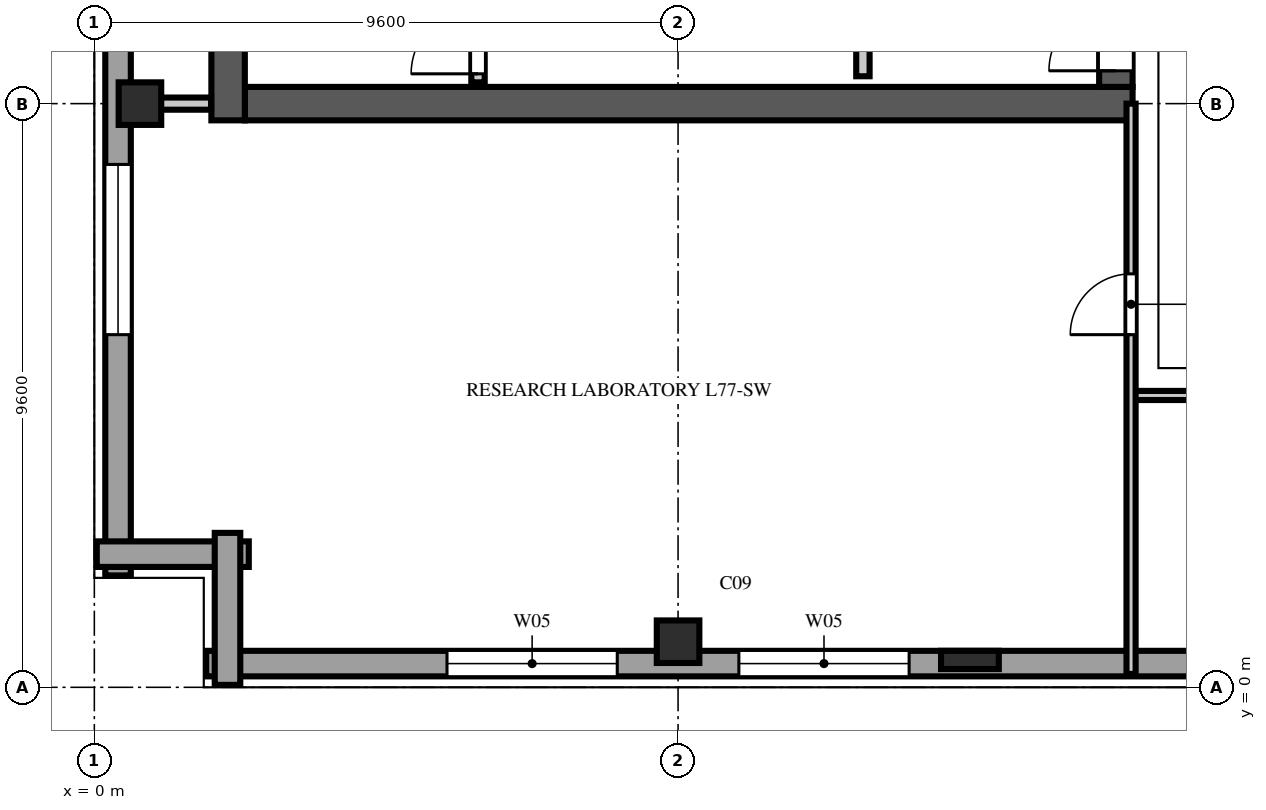
"""IFC4 building model, lengths in metres.
Left out: names, types, materials, properties, quantities, classifications, styles, units other than length and angle.
Written with IfcOpenShell. Run it as: python <this file> out.ifc"""

import sys

from ifc_helpers import new_model, si_unit, direction, frame, frame_2d, origin, origin_2d, place, context, subcontext, project, spatial, rectangle, extrude, element, fill, save


model = new_model("IFC4")
c1 = context("Model", 3, precision=1e-05, world=origin(), true_north=direction((0.0, 1.0)))
c2 = subcontext(c1, "Body", "Model", "MODEL_VIEW")
j1 = project(units=[si_unit("LENGTHUNIT", "METRE"), si_unit("PLANEANGLEUNIT", "RADIAN")], contexts=[c1])
p1 = place(None, origin())
s1 = spatial("IfcSite", under=j1, at=p1, CompositionType="ELEMENT")
p2 = place(p1, origin())
s2 = spatial("IfcBuilding", under=s1, at=p2, CompositionType="ELEMENT")
p3 = place(p2, frame((0.0, 0.0, 303.8)))
s3 = spatial("IfcBuildingStorey", under=s2, at=p3, CompositionType="ELEMENT", Elevation=303.8)
p4 = place(p3, frame((2.475, 9.6, 0.0), z_axis=(0.0, 0.0, 1.0), x_axis=(1.0, 0.0, 0.0)))
e1 = element("IfcWall", 1, at=p4, inside=s3, PredefinedType="SHEAR", context=c2, shape_type="SweptSolid", body=[
    extrude(rectangle(XDim=14.6, YDim=0.55, at=frame_2d((7.3, 0.0))), origin(), (0.0, 0.0, 1.0), 3.88),
])
p5 = place(p3, frame((2.2, 9.325, 0.0), z_axis=(0.0, 0.0, 1.0), x_axis=(0.0, 1.0, 0.0)))
e2 = element("IfcWall", 2, at=p5, inside=s3, PredefinedType="SHEAR", context=c2, shape_type="SweptSolid", body=[
    extrude(rectangle(XDim=38.95, YDim=0.55, at=frame_2d((19.475, 0.0))), origin(), (0.0, 0.0, 1.0), 3.88),
])
p6 = place(p3, frame((16.8, 9.875, 0.0), z_axis=(0.0, 0.0, 1.0), x_axis=(0.0, 1.0, 0.0)))
e3 = element("IfcWall", 3, at=p6, inside=s3, PredefinedType="SHEAR", context=c2, shape_type="SweptSolid", body=[
    extrude(rectangle(XDim=12.525, YDim=0.55, at=frame_2d((6.262, 0.0))), origin(), (0.0, 0.0, 1.0), 3.88),
])
p7 = place(p6, frame((0.265, 0.0, 0.0)))
e4 = element("IfcOpeningElement", 4, at=p7, cuts=e3, PredefinedType="OPENING", context=c2, shape_type="SweptSolid", body=[
    extrude(rectangle(XDim=1.1, YDim=2.2, at=frame_2d((0.55, 1.1))), frame((0.0, 0.287, 0.0), z_axis=(0.0, -1.0, 0.0), x_axis=(1.0, 0.0, 0.0)), (0.0, 0.0, 1.0), 0.574),
])
for number, where, z_axis, x_axis in (
    (5, (0.75, 9.6, 0.0), (0.0, 0.0, 1.0), (1.0, 0.0, 0.0)),
    (6, (9.6, 0.75, 0.0), (0.0, 0.0, 1.0), (1.0, 0.0, 0.0)),
):
    element("IfcColumn", number, at=place(p3, frame(where, z_axis=z_axis, x_axis=x_axis)), inside=s3, PredefinedType="COLUMN", context=c2, shape_type="SweptSolid", body=[
        extrude(rectangle(XDim=0.7, YDim=0.7, at=origin_2d()), origin(), (0.0, 0.0, 1.0), 4.2),
    ])
p8 = place(p3, frame((14.4, 0.45, 0.0), z_axis=(0.0, 0.0, 1.0), x_axis=(1.0, 0.0, 0.0)))
e7 = element("IfcColumn", 7, at=p8, inside=s3, PredefinedType="PILASTER", context=c2, shape_type="SweptSolid", body=[
    extrude(rectangle(XDim=0.95, YDim=0.3, at=origin_2d()), origin(), (0.0, 0.0, 1.0), 4.2),
])
p9 = place(p3, frame((1.84, 0.39, 0.0), z_axis=(0.0, 0.0, 1.0), x_axis=(1.0, 0.0, 0.0)))
e8 = element("IfcWall", 8, at=p9, inside=s3, PredefinedType="SOLIDWALL", context=c2, shape_type="SweptSolid", body=[
    extrude(rectangle(XDim=44.32, YDim=0.42, at=frame_2d((22.16, 0.0))), origin(), (0.0, 0.0, 1.0), 3.88),
])
p10 = place(p9, frame((3.96, 0.0, 0.75)))
e9 = element("IfcOpeningElement", 9, at=p10, cuts=e8, PredefinedType="OPENING", context=c2, shape_type="SweptSolid", body=[
    extrude(rectangle(XDim=2.8, YDim=2.3, at=frame_2d((1.4, 1.15))), frame((0.0, 0.222, 0.0), z_axis=(0.0, -1.0, 0.0), x_axis=(1.0, 0.0, 0.0)), (0.0, 0.0, 1.0), 0.444),
])
p11 = place(p9, frame((8.76, 0.0, 0.75)))
e10 = element("IfcOpeningElement", 10, at=p11, cuts=e8, PredefinedType="OPENING", context=c2, shape_type="SweptSolid", body=[
    extrude(rectangle(XDim=2.8, YDim=2.3, at=frame_2d((1.4, 1.15))), frame((0.0, 0.222, 0.0), z_axis=(0.0, -1.0, 0.0), x_axis=(1.0, 0.0, 0.0)), (0.0, 0.0, 1.0), 0.444),
])
p12 = place(p9, frame((18.36, 0.0, 0.75)))
e11 = element("IfcOpeningElement", 11, at=p12, cuts=e8, PredefinedType="OPENING", context=c2, shape_type="SweptSolid", body=[
    extrude(rectangle(XDim=2.8, YDim=2.3, at=frame_2d((1.4, 1.15))), frame((0.0, 0.222, 0.0), z_axis=(0.0, -1.0, 0.0), x_axis=(1.0, 0.0, 0.0)), (0.0, 0.0, 1.0), 0.444),
])
p13 = place(p9, frame((27.96, 0.0, 0.75)))
e12 = element("IfcOpeningElement", 12, at=p13, cuts=e8, PredefinedType="OPENING", context=c2, shape_type="SweptSolid", body=[
    extrude(rectangle(XDim=2.8, YDim=2.3, at=frame_2d((1.4, 1.15))), frame((0.0, 0.222, 0.0), z_axis=(0.0, -1.0, 0.0), x_axis=(1.0, 0.0, 0.0)), (0.0, 0.0, 1.0), 0.444),
])
p14 = place(p3, frame((0.39, 46.16, 0.0), z_axis=(0.0, 0.0, 1.0), x_axis=(0.0, -1.0, 0.0)))
e13 = element("IfcWall", 13, at=p14, inside=s3, PredefinedType="SOLIDWALL", context=c2, shape_type="SweptSolid", body=[
    extrude(rectangle(XDim=44.32, YDim=0.42, at=frame_2d((22.16, 0.0))), origin(), (0.0, 0.0, 1.0), 3.88),
])
p15 = place(p14, frame((13.56, 0.0, 0.75)))
e14 = element("IfcOpeningElement", 14, at=p15, cuts=e13, PredefinedType="OPENING", context=c2, shape_type="SweptSolid", body=[
    extrude(rectangle(XDim=2.8, YDim=2.3, at=frame_2d((1.4, 1.15))), frame((0.0, 0.222, 0.0), z_axis=(0.0, -1.0, 0.0), x_axis=(1.0, 0.0, 0.0)), (0.0, 0.0, 1.0), 0.444),
])
p16 = place(p14, frame((18.36, 0.0, 0.75)))
e15 = element("IfcOpeningElement", 15, at=p16, cuts=e13, PredefinedType="OPENING", context=c2, shape_type="SweptSolid", body=[
    extrude(rectangle(XDim=2.8, YDim=2.3, at=frame_2d((1.4, 1.15))), frame((0.0, 0.222, 0.0), z_axis=(0.0, -1.0, 0.0), x_axis=(1.0, 0.0, 0.0)), (0.0, 0.0, 1.0), 0.444),
])
p17 = place(p14, frame((23.16, 0.0, 0.75)))
e16 = element("IfcOpeningElement", 16, at=p17, cuts=e13, PredefinedType="OPENING", context=c2, shape_type="SweptSolid", body=[
    extrude(rectangle(XDim=2.8, YDim=2.3, at=frame_2d((1.4, 1.15))), frame((0.0, 0.222, 0.0), z_axis=(0.0, -1.0, 0.0), x_axis=(1.0, 0.0, 0.0)), (0.0, 0.0, 1.0), 0.444),
])
p18 = place(p14, frame((27.96, 0.0, 0.75)))
e17 = element("IfcOpeningElement", 17, at=p18, cuts=e13, PredefinedType="OPENING", context=c2, shape_type="SweptSolid", body=[
    extrude(rectangle(XDim=2.8, YDim=2.3, at=frame_2d((1.4, 1.15))), frame((0.0, 0.222, 0.0), z_axis=(0.0, -1.0, 0.0), x_axis=(1.0, 0.0, 0.0)), (0.0, 0.0, 1.0), 0.444),
])
p19 = place(p14, frame((32.76, 0.0, 0.75)))
e18 = element("IfcOpeningElement", 18, at=p19, cuts=e13, PredefinedType="OPENING", context=c2, shape_type="SweptSolid", body=[
    extrude(rectangle(XDim=2.8, YDim=2.3, at=frame_2d((1.4, 1.15))), frame((0.0, 0.222, 0.0), z_axis=(0.0, -1.0, 0.0), x_axis=(1.0, 0.0, 0.0)), (0.0, 0.0, 1.0), 0.444),
])
p20 = place(p14, frame((37.56, 0.0, 0.75)))
e19 = element("IfcOpeningElement", 19, at=p20, cuts=e13, PredefinedType="OPENING", context=c2, shape_type="SweptSolid", body=[
    extrude(rectangle(XDim=2.8, YDim=2.3, at=frame_2d((1.4, 1.15))), frame((0.0, 0.222, 0.0), z_axis=(0.0, -1.0, 0.0), x_axis=(1.0, 0.0, 0.0)), (0.0, 0.0, 1.0), 0.444),
])
for number, where, z_axis, x_axis in (
    (20, (0.04, 2.19, 0.0), (0.0, 0.0, 1.0), (1.0, 0.0, 0.0)),
    (21, (2.19, 2.54, 0.0), (0.0, 0.0, 1.0), (0.0, -1.0, 0.0)),
):
    element("IfcWall", number, at=place(p3, frame(where, z_axis=z_axis, x_axis=x_axis)), inside=s3, PredefinedType="SOLIDWALL", context=c2, shape_type="SweptSolid", body=[
        extrude(rectangle(XDim=2.5, YDim=0.42, at=frame_2d((1.25, 0.0))), origin(), (0.0, 0.0, 1.0), 3.88),
    ])
p21 = place(p3, frame((6.31, 9.95, 0.0), z_axis=(0.0, 0.0, 1.0), x_axis=(0.0, 1.0, 0.0)))
e22 = element("IfcWall", 22, at=p21, inside=s3, PredefinedType="SOLIDWALL", context=c2, shape_type="SweptSolid", body=[
    extrude(rectangle(XDim=7.81, YDim=0.22, at=frame_2d((3.905, 0.0))), origin(), (0.0, 0.0, 1.0), 3.88),
])
p22 = place(p21, frame((0.14, 0.0, 0.0)))
e23 = element("IfcOpeningElement", 23, at=p22, cuts=e22, PredefinedType="OPENING", context=c2, shape_type="SweptSolid", body=[
    extrude(rectangle(XDim=1.1, YDim=2.2, at=frame_2d((0.55, 1.1))), frame((0.0, 0.122, 0.0), z_axis=(0.0, -1.0, 0.0), x_axis=(1.0, 0.0, 0.0)), (0.0, 0.0, 1.0), 0.244),
])
p23 = place(p3, frame((12.64, 10.05, 0.0), z_axis=(0.0, 0.0, 1.0), x_axis=(0.0, 1.0, 0.0)))
e24 = element("IfcWall", 24, at=p23, inside=s3, PredefinedType="SOLIDWALL", context=c2, shape_type="SweptSolid", body=[
    extrude(rectangle(XDim=7.71, YDim=0.22, at=frame_2d((3.855, 0.0))), origin(), (0.0, 0.0, 1.0), 3.88),
])
p24 = place(p3, frame((0.85, 9.6, 0.0), z_axis=(0.0, 0.0, 1.0), x_axis=(1.0, 0.0, 0.0)))
e25 = element("IfcWall", 25, at=p24, inside=s3, PredefinedType="SOLIDWALL", context=c2, shape_type="SweptSolid", body=[
    extrude(rectangle(XDim=1.07, YDim=0.2, at=frame_2d((0.535, 0.0))), origin(), (0.0, 0.0, 1.0), 3.572),
])
p25 = place(p3, frame((17.05, 4.8, 0.0), z_axis=(0.0, 0.0, 1.0), x_axis=(1.0, 0.0, 0.0)))
e26 = element("IfcWall", 26, at=p25, inside=s3, PredefinedType="PARTITIONING", context=c2, shape_type="SweptSolid", body=[
    extrude(rectangle(XDim=2.15, YDim=0.15, at=frame_2d((1.075, 0.0))), origin(), (0.0, 0.0, 1.0), 3.88),
])
p26 = place(p3, frame((17.05, 0.22, 0.0), z_axis=(0.0, 0.0, 1.0), x_axis=(0.0, 1.0, 0.0)))
e27 = element("IfcWall", 27, at=p26, inside=s3, PredefinedType="PARTITIONING", context=c2, shape_type="SweptSolid", body=[
    extrude(rectangle(XDim=9.38, YDim=0.15, at=frame_2d((4.69, 0.0))), origin(), (0.0, 0.0, 1.0), 3.88),
])
p27 = place(p26, frame((5.58, 0.0, 0.0)))
e28 = element("IfcOpeningElement", 28, at=p27, cuts=e27, PredefinedType="OPENING", context=c2, shape_type="SweptSolid", body=[
    extrude(rectangle(XDim=1.0, YDim=2.2, at=frame_2d((0.5, 1.1))), frame((0.0, 0.087, 0.0), z_axis=(0.0, -1.0, 0.0), x_axis=(1.0, 0.0, 0.0)), (0.0, 0.0, 1.0), 0.174),
])
p28 = place(p10, origin())
e29 = element("IfcWindow", 29, at=p28, inside=s3, PartitioningType="TRIPLE_PANEL_VERTICAL", PredefinedType="WINDOW", context=c2, shape_type="SweptSolid", body=[
    extrude(rectangle(XDim=2.8, YDim=2.3, at=frame_2d((1.4, 1.15))), frame((0.0, 0.11, 0.0), z_axis=(0.0, -1.0, 0.0), x_axis=(1.0, 0.0, 0.0)), (0.0, 0.0, 1.0), 0.06),
])
fill(e9, e29)
p29 = place(p11, origin())
e30 = element("IfcWindow", 30, at=p29, inside=s3, PartitioningType="TRIPLE_PANEL_VERTICAL", PredefinedType="WINDOW", context=c2, shape_type="SweptSolid", body=[
    extrude(rectangle(XDim=2.8, YDim=2.3, at=frame_2d((1.4, 1.15))), frame((0.0, 0.11, 0.0), z_axis=(0.0, -1.0, 0.0), x_axis=(1.0, 0.0, 0.0)), (0.0, 0.0, 1.0), 0.06),
])
fill(e10, e30)
p30 = place(p20, origin())
e31 = element("IfcWindow", 31, at=p30, inside=s3, PartitioningType="TRIPLE_PANEL_VERTICAL", PredefinedType="WINDOW", context=c2, shape_type="SweptSolid", body=[
    extrude(rectangle(XDim=2.8, YDim=2.3, at=frame_2d((1.4, 1.15))), frame((0.0, 0.11, 0.0), z_axis=(0.0, -1.0, 0.0), x_axis=(1.0, 0.0, 0.0)), (0.0, 0.0, 1.0), 0.06),
])
fill(e19, e31)
p31 = place(p22, origin())
e32 = element("IfcDoor", 32, at=p31, inside=s3, OperationType="SINGLE_SWING_LEFT", PredefinedType="DOOR", context=c2, shape_type="SweptSolid", body=[
    extrude(rectangle(XDim=1.1, YDim=2.2, at=frame_2d((0.55, 1.1))), frame((0.0, 0.025, 0.0), z_axis=(0.0, -1.0, 0.0), x_axis=(1.0, 0.0, 0.0)), (0.0, 0.0, 1.0), 0.05),
])
fill(e23, e32)
p32 = place(p7, origin())
e33 = element("IfcDoor", 33, at=p32, inside=s3, OperationType="SINGLE_SWING_LEFT", PredefinedType="DOOR", context=c2, shape_type="SweptSolid", body=[
    extrude(rectangle(XDim=1.1, YDim=2.2, at=frame_2d((0.55, 1.1))), frame((0.0, 0.025, 0.0), z_axis=(0.0, -1.0, 0.0), x_axis=(1.0, 0.0, 0.0)), (0.0, 0.0, 1.0), 0.05),
])
fill(e4, e33)
p33 = place(p27, origin())
e34 = element("IfcDoor", 34, at=p33, inside=s3, OperationType="SINGLE_SWING_LEFT", PredefinedType="DOOR", context=c2, shape_type="SweptSolid", body=[
    extrude(rectangle(XDim=1.0, YDim=2.2, at=frame_2d((0.5, 1.1))), frame((0.0, 0.025, 0.0), z_axis=(0.0, -1.0, 0.0), x_axis=(1.0, 0.0, 0.0)), (0.0, 0.0, 1.0), 0.05),
])
fill(e28, e34)
save(model, sys.argv[1])
